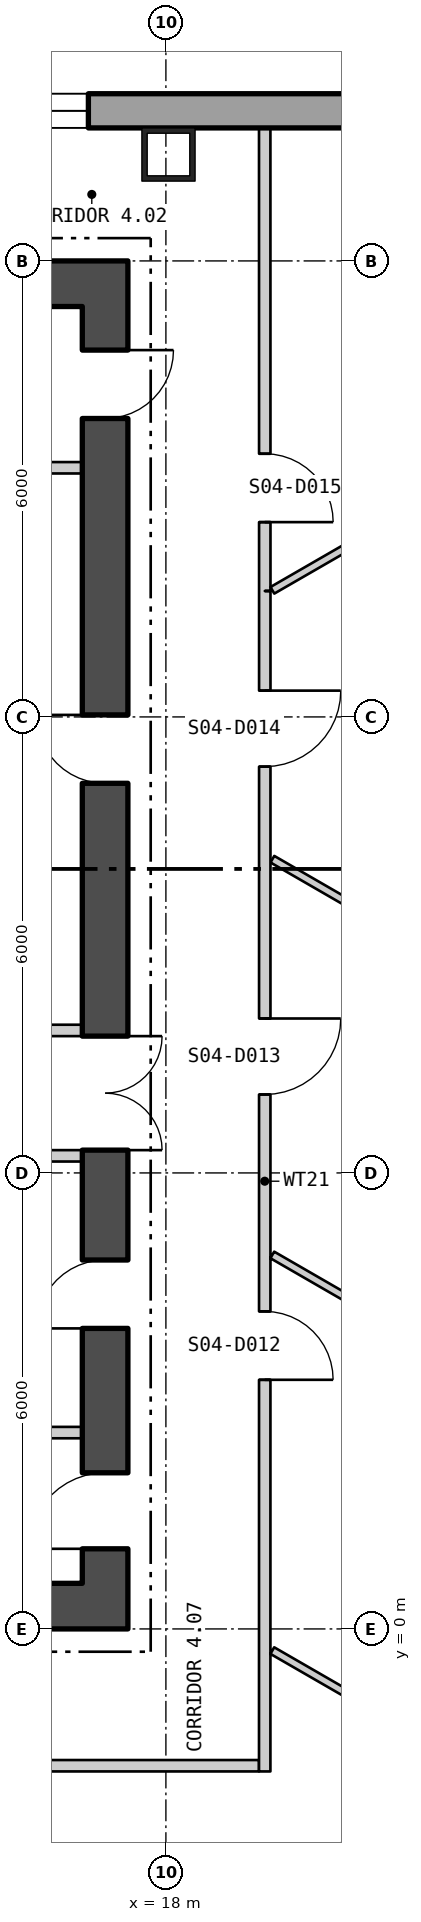
"""IFC4 building model, lengths in metres.
Left out: names, types, materials, properties, quantities, classifications, styles, units other than length and angle.
Written with IfcOpenShell. Run it as: python <this file> out.ifc"""

import sys

from ifc_helpers import new_model, si_unit, direction, frame, frame_2d, origin, origin_2d, place, context, subcontext, project, spatial, polyline, rectangle, hollow_rectangle, outline, extrude, element, fill, save


model = new_model("IFC4")
c1 = context("Model", 3, precision=1e-05, world=origin(), true_north=direction((0.0, 1.0)))
c2 = subcontext(c1, "Body", "Model", "MODEL_VIEW")
j1 = project(units=[si_unit("LENGTHUNIT", "METRE"), si_unit("PLANEANGLEUNIT", "RADIAN")], contexts=[c1])
p1 = place(None, origin())
s1 = spatial("IfcSite", under=j1, at=p1, CompositionType="ELEMENT")
p2 = place(p1, origin())
s2 = spatial("IfcBuilding", under=s1, at=p2, CompositionType="ELEMENT")
p3 = place(p2, frame((0.0, 0.0, 60.3)))
s3 = spatial("IfcBuildingStorey", under=s2, at=p3, CompositionType="ELEMENT", Elevation=60.3)
p4 = place(p3, frame((18.034, 19.4, 0.0), z_axis=(0.0, 0.0, 1.0), x_axis=(-1.0, 0.0, 0.0)))
e1 = element("IfcColumn", 1, at=p4, inside=s3, PredefinedType="COLUMN", context=c2, shape_type="SweptSolid", body=[
    extrude(hollow_rectangle(XDim=0.7, YDim=0.7, WallThickness=0.07, at=origin_2d()), origin(), (0.0, 0.0, 1.0), 4.5),
])
p5 = place(p3, frame((22.875, 19.975, -0.4), z_axis=(0.0, 0.0, 1.0), x_axis=(-1.0, 0.0, 0.0)))
e2 = element("IfcWall", 2, at=p5, inside=s3, PredefinedType="SOLIDWALL", context=c2, shape_type="SweptSolid", body=[
    extrude(outline(polyline([(-0.13, -0.225), (45.88, -0.225), (45.62, 0.225), (0.13, 0.225), (-0.13, -0.225)])), origin(), (0.0, 0.0, 1.0), 4.5),
])
p6 = place(p5, frame((5.895, 0.0, 1.3)))
e3 = element("IfcOpeningElement", 3, at=p6, cuts=e2, PredefinedType="OPENING", context=c2, shape_type="SweptSolid", body=[
    extrude(rectangle(XDim=2.4, YDim=2.6, at=frame_2d((1.2, 1.3))), frame((0.0, 0.235, 0.0), z_axis=(0.0, -1.0, 0.0), x_axis=(1.0, 0.0, 0.0)), (0.0, 0.0, 1.0), 0.47),
])
p7 = place(p5, frame((10.403, 0.0, 1.3)))
e4 = element("IfcOpeningElement", 4, at=p7, cuts=e2, PredefinedType="OPENING", context=c2, shape_type="SweptSolid", body=[
    extrude(rectangle(XDim=2.4, YDim=2.6, at=frame_2d((1.2, 1.3))), frame((0.0, 0.235, 0.0), z_axis=(0.0, -1.0, 0.0), x_axis=(1.0, 0.0, 0.0)), (0.0, 0.0, 1.0), 0.47),
])
p8 = place(p5, frame((14.912, 0.0, 1.3)))
e5 = element("IfcOpeningElement", 5, at=p8, cuts=e2, PredefinedType="OPENING", context=c2, shape_type="SweptSolid", body=[
    extrude(rectangle(XDim=2.4, YDim=2.6, at=frame_2d((1.2, 1.3))), frame((0.0, 0.235, 0.0), z_axis=(0.0, -1.0, 0.0), x_axis=(1.0, 0.0, 0.0)), (0.0, 0.0, 1.0), 0.47),
])
p9 = place(p5, frame((19.421, 0.0, 1.3)))
e6 = element("IfcOpeningElement", 6, at=p9, cuts=e2, PredefinedType="OPENING", context=c2, shape_type="SweptSolid", body=[
    extrude(rectangle(XDim=2.4, YDim=2.6, at=frame_2d((1.2, 1.3))), frame((0.0, 0.235, 0.0), z_axis=(0.0, -1.0, 0.0), x_axis=(1.0, 0.0, 0.0)), (0.0, 0.0, 1.0), 0.47),
])
p10 = place(p5, frame((23.929, 0.0, 1.3)))
e7 = element("IfcOpeningElement", 7, at=p10, cuts=e2, PredefinedType="OPENING", context=c2, shape_type="SweptSolid", body=[
    extrude(rectangle(XDim=2.4, YDim=2.6, at=frame_2d((1.2, 1.3))), frame((0.0, 0.235, 0.0), z_axis=(0.0, -1.0, 0.0), x_axis=(1.0, 0.0, 0.0)), (0.0, 0.0, 1.0), 0.47),
])
p11 = place(p5, frame((28.438, 0.0, 1.3)))
e8 = element("IfcOpeningElement", 8, at=p11, cuts=e2, PredefinedType="OPENING", context=c2, shape_type="SweptSolid", body=[
    extrude(rectangle(XDim=2.4, YDim=2.6, at=frame_2d((1.2, 1.3))), frame((0.0, 0.235, 0.0), z_axis=(0.0, -1.0, 0.0), x_axis=(1.0, 0.0, 0.0)), (0.0, 0.0, 1.0), 0.47),
])
p12 = place(p5, frame((32.947, 0.0, 1.3)))
e9 = element("IfcOpeningElement", 9, at=p12, cuts=e2, PredefinedType="OPENING", context=c2, shape_type="SweptSolid", body=[
    extrude(rectangle(XDim=2.4, YDim=2.6, at=frame_2d((1.2, 1.3))), frame((0.0, 0.235, 0.0), z_axis=(0.0, -1.0, 0.0), x_axis=(1.0, 0.0, 0.0)), (0.0, 0.0, 1.0), 0.47),
])
p13 = place(p5, frame((37.455, 0.0, 1.3)))
e10 = element("IfcOpeningElement", 10, at=p13, cuts=e2, PredefinedType="OPENING", context=c2, shape_type="SweptSolid", body=[
    extrude(rectangle(XDim=2.4, YDim=2.6, at=frame_2d((1.2, 1.3))), frame((0.0, 0.235, 0.0), z_axis=(0.0, -1.0, 0.0), x_axis=(1.0, 0.0, 0.0)), (0.0, 0.0, 1.0), 0.47),
])
p14 = place(p3, frame((5.425, -29.042, -0.18), z_axis=(0.0, 0.0, 1.0), x_axis=(0.499999388847, 0.866025756634, 0.0)))
e11 = element("IfcWall", 11, at=p14, inside=s3, PredefinedType="SOLIDWALL", context=c2, shape_type="SweptSolid", body=[
    extrude(outline(polyline([(-0.13, -0.225), (45.88, -0.225), (45.62, 0.225), (0.13, 0.225), (-0.13, -0.225)])), origin(), (0.0, 0.0, 1.0), 4.28),
])
p15 = place(p14, frame((1.425, 0.0, 1.08)))
e12 = element("IfcOpeningElement", 12, at=p15, cuts=e11, PredefinedType="OPENING", context=c2, shape_type="SweptSolid", body=[
    extrude(rectangle(XDim=2.4, YDim=2.6, at=frame_2d((1.2, 1.3))), frame((0.0, 0.235, 0.0), z_axis=(0.0, -1.0, 0.0), x_axis=(1.0, 0.0, 0.0)), (0.0, 0.0, 1.0), 0.47),
])
p16 = place(p14, frame((5.895, 0.0, 1.08)))
e13 = element("IfcOpeningElement", 13, at=p16, cuts=e11, PredefinedType="OPENING", context=c2, shape_type="SweptSolid", body=[
    extrude(rectangle(XDim=2.4, YDim=2.6, at=frame_2d((1.2, 1.3))), frame((0.0, 0.235, 0.0), z_axis=(0.0, -1.0, 0.0), x_axis=(1.0, 0.0, 0.0)), (0.0, 0.0, 1.0), 0.47),
])
p17 = place(p14, frame((10.403, 0.0, 1.08)))
e14 = element("IfcOpeningElement", 14, at=p17, cuts=e11, PredefinedType="OPENING", context=c2, shape_type="SweptSolid", body=[
    extrude(rectangle(XDim=2.4, YDim=2.6, at=frame_2d((1.2, 1.3))), frame((0.0, 0.235, 0.0), z_axis=(0.0, -1.0, 0.0), x_axis=(1.0, 0.0, 0.0)), (0.0, 0.0, 1.0), 0.47),
])
p18 = place(p14, frame((14.912, 0.0, 1.08)))
e15 = element("IfcOpeningElement", 15, at=p18, cuts=e11, PredefinedType="OPENING", context=c2, shape_type="SweptSolid", body=[
    extrude(rectangle(XDim=2.4, YDim=2.6, at=frame_2d((1.2, 1.3))), frame((0.0, 0.235, 0.0), z_axis=(0.0, -1.0, 0.0), x_axis=(1.0, 0.0, 0.0)), (0.0, 0.0, 1.0), 0.47),
])
p19 = place(p14, frame((19.421, 0.0, 1.08)))
e16 = element("IfcOpeningElement", 16, at=p19, cuts=e11, PredefinedType="OPENING", context=c2, shape_type="SweptSolid", body=[
    extrude(rectangle(XDim=2.4, YDim=2.6, at=frame_2d((1.2, 1.3))), frame((0.0, 0.235, 0.0), z_axis=(0.0, -1.0, 0.0), x_axis=(1.0, 0.0, 0.0)), (0.0, 0.0, 1.0), 0.47),
])
p20 = place(p14, frame((23.929, 0.0, 1.08)))
e17 = element("IfcOpeningElement", 17, at=p20, cuts=e11, PredefinedType="OPENING", context=c2, shape_type="SweptSolid", body=[
    extrude(rectangle(XDim=2.4, YDim=2.6, at=frame_2d((1.2, 1.3))), frame((0.0, 0.235, 0.0), z_axis=(0.0, -1.0, 0.0), x_axis=(1.0, 0.0, 0.0)), (0.0, 0.0, 1.0), 0.47),
])
p21 = place(p14, frame((28.438, 0.0, 1.08)))
e18 = element("IfcOpeningElement", 18, at=p21, cuts=e11, PredefinedType="OPENING", context=c2, shape_type="SweptSolid", body=[
    extrude(rectangle(XDim=2.4, YDim=2.6, at=frame_2d((1.2, 1.3))), frame((0.0, 0.235, 0.0), z_axis=(0.0, -1.0, 0.0), x_axis=(1.0, 0.0, 0.0)), (0.0, 0.0, 1.0), 0.47),
])
p22 = place(p14, frame((32.947, 0.0, 1.08)))
e19 = element("IfcOpeningElement", 19, at=p22, cuts=e11, PredefinedType="OPENING", context=c2, shape_type="SweptSolid", body=[
    extrude(rectangle(XDim=2.4, YDim=2.6, at=frame_2d((1.2, 1.3))), frame((0.0, 0.235, 0.0), z_axis=(0.0, -1.0, 0.0), x_axis=(1.0, 0.0, 0.0)), (0.0, 0.0, 1.0), 0.47),
])
p23 = place(p14, frame((37.455, 0.0, 1.08)))
e20 = element("IfcOpeningElement", 20, at=p23, cuts=e11, PredefinedType="OPENING", context=c2, shape_type="SweptSolid", body=[
    extrude(rectangle(XDim=2.4, YDim=2.6, at=frame_2d((1.2, 1.3))), frame((0.0, 0.235, 0.0), z_axis=(0.0, -1.0, 0.0), x_axis=(1.0, 0.0, 0.0)), (0.0, 0.0, 1.0), 0.47),
])
p24 = place(p14, frame((41.925, 0.0, 1.08)))
e21 = element("IfcOpeningElement", 21, at=p24, cuts=e11, PredefinedType="OPENING", context=c2, shape_type="SweptSolid", body=[
    extrude(rectangle(XDim=2.4, YDim=2.6, at=frame_2d((1.2, 1.3))), frame((0.0, 0.235, 0.0), z_axis=(0.0, -1.0, 0.0), x_axis=(1.0, 0.0, 0.0)), (0.0, 0.0, 1.0), 0.47),
])
p25 = place(p3, frame((-17.5, 0.3, 0.0), z_axis=(0.0, 0.0, 1.0), x_axis=(1.0, 0.0, 0.0)))
e22 = element("IfcWall", 22, at=p25, inside=s3, PredefinedType="SHEAR", context=c2, shape_type="SweptSolid", body=[
    extrude(rectangle(XDim=35.0, YDim=0.6, at=frame_2d((17.5, 0.0))), origin(), (0.0, 0.0, 1.0), 4.3),
])
p26 = place(p25, frame((12.0, 0.0, 0.0)))
e23 = element("IfcOpeningElement", 23, at=p26, cuts=e22, PredefinedType="OPENING", context=c2, shape_type="SweptSolid", body=[
    extrude(rectangle(XDim=1.8, YDim=2.4, at=frame_2d((0.9, 1.2))), frame((0.0, 0.31, 0.0), z_axis=(0.0, -1.0, 0.0), x_axis=(1.0, 0.0, 0.0)), (0.0, 0.0, 1.0), 0.62),
])
p27 = place(p25, frame((22.0, 0.0, 0.0)))
e24 = element("IfcOpeningElement", 24, at=p27, cuts=e22, PredefinedType="OPENING", context=c2, shape_type="SweptSolid", body=[
    extrude(rectangle(XDim=1.8, YDim=2.4, at=frame_2d((0.9, 1.2))), frame((0.0, 0.31, 0.0), z_axis=(0.0, -1.0, 0.0), x_axis=(1.0, 0.0, 0.0)), (0.0, 0.0, 1.0), 0.62),
])
p28 = place(p3, frame((-17.5, 17.7, 0.0), z_axis=(0.0, 0.0, 1.0), x_axis=(1.0, 0.0, 0.0)))
e25 = element("IfcWall", 25, at=p28, inside=s3, PredefinedType="SHEAR", context=c2, shape_type="SweptSolid", body=[
    extrude(rectangle(XDim=35.0, YDim=0.6, at=frame_2d((17.5, 0.0))), origin(), (0.0, 0.0, 1.0), 4.3),
])
p29 = place(p3, frame((17.2, 0.6, 0.0), z_axis=(0.0, 0.0, 1.0), x_axis=(0.0, 1.0, 0.0)))
e26 = element("IfcWall", 26, at=p29, inside=s3, PredefinedType="SHEAR", context=c2, shape_type="SweptSolid", body=[
    extrude(rectangle(XDim=16.8, YDim=0.6, at=frame_2d((8.4, 0.0))), origin(), (0.0, 0.0, 1.0), 4.3),
])
p30 = place(p29, frame((5.7, 0.0, 0.0)))
e27 = element("IfcOpeningElement", 27, at=p30, cuts=e26, PredefinedType="OPENING", context=c2, shape_type="SweptSolid", body=[
    extrude(rectangle(XDim=1.5, YDim=2.1, at=frame_2d((0.75, 1.05))), frame((0.0, 0.31, 0.0), z_axis=(0.0, -1.0, 0.0), x_axis=(1.0, 0.0, 0.0)), (0.0, 0.0, 1.0), 0.62),
])
p31 = place(p29, frame((0.454, 0.0, 0.0)))
e28 = element("IfcOpeningElement", 28, at=p31, cuts=e26, PredefinedType="OPENING", context=c2, shape_type="SweptSolid", body=[
    extrude(rectangle(XDim=1.0, YDim=2.1, at=frame_2d((0.5, 1.05))), frame((0.0, 0.31, 0.0), z_axis=(0.0, -1.0, 0.0), x_axis=(1.0, 0.0, 0.0)), (0.0, 0.0, 1.0), 0.62),
])
p32 = place(p29, frame((3.354, 0.0, 0.0)))
e29 = element("IfcOpeningElement", 29, at=p32, cuts=e26, PredefinedType="OPENING", context=c2, shape_type="SweptSolid", body=[
    extrude(rectangle(XDim=0.9, YDim=2.1, at=frame_2d((0.45, 1.05))), frame((0.0, 0.31, 0.0), z_axis=(0.0, -1.0, 0.0), x_axis=(1.0, 0.0, 0.0)), (0.0, 0.0, 1.0), 0.62),
])
p33 = place(p29, frame((10.527, 0.0, 0.0)))
e30 = element("IfcOpeningElement", 30, at=p33, cuts=e26, PredefinedType="OPENING", context=c2, shape_type="SweptSolid", body=[
    extrude(rectangle(XDim=0.9, YDim=2.1, at=frame_2d((0.45, 1.05))), frame((0.0, 0.31, 0.0), z_axis=(0.0, -1.0, 0.0), x_axis=(1.0, 0.0, 0.0)), (0.0, 0.0, 1.0), 0.62),
])
p34 = place(p29, frame((15.327, 0.0, 0.0)))
e31 = element("IfcOpeningElement", 31, at=p34, cuts=e26, PredefinedType="OPENING", context=c2, shape_type="SweptSolid", body=[
    extrude(rectangle(XDim=0.9, YDim=2.1, at=frame_2d((0.45, 1.05))), frame((0.0, 0.31, 0.0), z_axis=(0.0, -1.0, 0.0), x_axis=(1.0, 0.0, 0.0)), (0.0, 0.0, 1.0), 0.62),
])
for number, where, z_axis, x_axis in (
    (32, (14.5, 6.225, 0.0), (0.0, 0.0, 1.0), (1.0, 0.0, 0.0)),
    (33, (14.5, 7.875, 0.0), (0.0, 0.0, 1.0), (1.0, 0.0, 0.0)),
    (34, (14.5, 2.583, 0.0), (0.0, 0.0, 1.0), (1.0, 0.0, 0.0)),
    (35, (14.5, 15.278, 0.0), (0.0, 0.0, 1.0), (1.0, 0.0, 0.0)),
):
    element("IfcWall", number, at=place(p3, frame(where, z_axis=z_axis, x_axis=x_axis)), inside=s3, PredefinedType="PARTITIONING", context=c2, shape_type="SweptSolid", body=[
        extrude(rectangle(XDim=2.4, YDim=0.15, at=frame_2d((1.2, 0.0))), origin(), (0.0, 0.0, 1.0), 4.3),
    ])
p35 = place(p3, frame((7.855, -1.8, 0.0), z_axis=(0.0, 0.0, 1.0), x_axis=(1.0, 0.0, 0.0)))
e36 = element("IfcWall", 36, at=p35, inside=s3, PredefinedType="PARTITIONING", context=c2, shape_type="SweptSolid", body=[
    extrude(rectangle(XDim=11.37, YDim=0.15, at=frame_2d((5.685, 0.0))), origin(), (0.0, 0.0, 1.0), 4.3),
])
p36 = place(p35, frame((2.001, 0.0, 0.0)))
e37 = element("IfcOpeningElement", 37, at=p36, cuts=e36, PredefinedType="OPENING", context=c2, shape_type="SweptSolid", body=[
    extrude(rectangle(XDim=1.0, YDim=2.1, at=frame_2d((0.5, 1.05))), frame((0.0, 0.085, 0.0), z_axis=(0.0, -1.0, 0.0), x_axis=(1.0, 0.0, 0.0)), (0.0, 0.0, 1.0), 0.17),
])
p37 = place(p35, frame((7.455, 0.0, 0.0)))
e38 = element("IfcOpeningElement", 38, at=p37, cuts=e36, PredefinedType="OPENING", context=c2, shape_type="SweptSolid", body=[
    extrude(rectangle(XDim=0.9, YDim=2.1, at=frame_2d((0.45, 1.05))), frame((0.0, 0.085, 0.0), z_axis=(0.0, -1.0, 0.0), x_axis=(1.0, 0.0, 0.0)), (0.0, 0.0, 1.0), 0.17),
])
p38 = place(p3, frame((13.249, -1.94, 0.0), z_axis=(0.0, 0.0, 1.0), x_axis=(0.866035445757, -0.49998260639, 0.0)))
e39 = element("IfcWall", 39, at=p38, inside=s3, PredefinedType="PARTITIONING", context=c2, shape_type="SweptSolid", body=[
    extrude(rectangle(XDim=6.1, YDim=0.15, at=frame_2d((3.05, 0.0))), origin(), (0.0, 0.0, 1.0), 4.3),
])
p39 = place(p3, frame((19.3, -1.875, 0.0), z_axis=(0.0, 0.0, 1.0), x_axis=(6.4383209e-05, 0.999999997927, 0.0)))
e40 = element("IfcWall", 40, at=p39, inside=s3, PredefinedType="PARTITIONING", context=c2, shape_type="SweptSolid", body=[
    extrude(rectangle(XDim=15.532, YDim=0.15, at=frame_2d((7.766, 0.0))), origin(), (0.0, 0.0, 1.0), 4.3),
])
p40 = place(p39, frame((5.153, 0.0, 0.0)))
e41 = element("IfcOpeningElement", 41, at=p40, cuts=e40, PredefinedType="OPENING", context=c2, shape_type="SweptSolid", body=[
    extrude(rectangle(XDim=0.9, YDim=2.1, at=frame_2d((0.45, 1.05))), frame((0.0, 0.085, 0.0), z_axis=(0.0, -1.0, 0.0), x_axis=(1.0, 0.0, 0.0)), (0.0, 0.0, 1.0), 0.17),
])
p41 = place(p39, frame((8.907, 0.0, 0.0)))
e42 = element("IfcOpeningElement", 42, at=p41, cuts=e40, PredefinedType="OPENING", context=c2, shape_type="SweptSolid", body=[
    extrude(rectangle(XDim=1.0, YDim=2.1, at=frame_2d((0.5, 1.05))), frame((0.0, 0.085, 0.0), z_axis=(0.0, -1.0, 0.0), x_axis=(1.0, 0.0, 0.0)), (0.0, 0.0, 1.0), 0.17),
])
p42 = place(p39, frame((13.221, 0.0, 0.0)))
e43 = element("IfcOpeningElement", 43, at=p42, cuts=e40, PredefinedType="OPENING", context=c2, shape_type="SweptSolid", body=[
    extrude(rectangle(XDim=1.0, YDim=2.1, at=frame_2d((0.5, 1.05))), frame((0.0, 0.085, 0.0), z_axis=(0.0, -1.0, 0.0), x_axis=(1.0, 0.0, 0.0)), (0.0, 0.0, 1.0), 0.17),
])
p43 = place(p3, frame((19.3, 19.749, 0.0), z_axis=(0.0, 0.0, 1.0), x_axis=(0.000164149702, -0.999999986527, 0.0)))
e44 = element("IfcWall", 44, at=p43, inside=s3, PredefinedType="PARTITIONING", context=c2, shape_type="SweptSolid", body=[
    extrude(rectangle(XDim=6.092, YDim=0.15, at=frame_2d((3.046, 0.0))), origin(), (0.0, 0.0, 1.0), 4.3),
])
p44 = place(p43, frame((4.286, 0.0, 0.0)))
e45 = element("IfcOpeningElement", 45, at=p44, cuts=e44, PredefinedType="OPENING", context=c2, shape_type="SweptSolid", body=[
    extrude(rectangle(XDim=0.9, YDim=2.1, at=frame_2d((0.45, 1.05))), frame((0.0, 0.085, 0.0), z_axis=(0.0, -1.0, 0.0), x_axis=(1.0, 0.0, 0.0)), (0.0, 0.0, 1.0), 0.17),
])
p45 = place(p3, frame((19.4, -0.285, 0.0), z_axis=(0.0, 0.0, 1.0), x_axis=(0.866237568633, -0.499632339514, 0.0)))
e46 = element("IfcWall", 46, at=p45, inside=s3, PredefinedType="PARTITIONING", context=c2, shape_type="SweptSolid", body=[
    extrude(rectangle(XDim=1.601, YDim=0.1, at=frame_2d((0.801, 0.0))), origin(), (0.0, 0.0, 1.0), 4.3),
])
p46 = place(p3, frame((19.4, 4.921, 0.0), z_axis=(0.0, 0.0, 1.0), x_axis=(0.866039032844, -0.499976393034, 0.0)))
e47 = element("IfcWall", 47, at=p46, inside=s3, PredefinedType="PARTITIONING", context=c2, shape_type="SweptSolid", body=[
    extrude(rectangle(XDim=4.204, YDim=0.1, at=frame_2d((2.102, 0.0))), origin(), (0.0, 0.0, 1.0), 4.3),
])
p47 = place(p3, frame((19.401, 10.128, 0.0), z_axis=(0.0, 0.0, 1.0), x_axis=(0.865992313895, -0.50005730899, 0.0)))
e48 = element("IfcWall", 48, at=p47, inside=s3, PredefinedType="PARTITIONING", context=c2, shape_type="SweptSolid", body=[
    extrude(rectangle(XDim=6.807, YDim=0.1, at=frame_2d((3.404, 0.0))), origin(), (0.0, 0.0, 1.0), 4.3),
])
p48 = place(p3, frame((19.401, 13.666, 0.0), z_axis=(0.0, 0.0, 1.0), x_axis=(0.866161319146, 0.499764513761, 0.0)))
e49 = element("IfcWall", 49, at=p48, inside=s3, PredefinedType="PARTITIONING", context=c2, shape_type="SweptSolid", body=[
    extrude(rectangle(XDim=5.489, YDim=0.1, at=frame_2d((2.744, 0.0))), origin(), (0.0, 0.0, 1.0), 4.3),
])
p49 = place(p6, origin())
e50 = element("IfcWindow", 50, at=p49, inside=s3, PartitioningType="SINGLE_PANEL", PredefinedType="WINDOW", context=c2, shape_type="SweptSolid", body=[
    extrude(rectangle(XDim=2.4, YDim=2.6, at=frame_2d((1.2, 1.3))), frame((0.0, 0.105, 0.0), z_axis=(0.0, -1.0, 0.0), x_axis=(1.0, 0.0, 0.0)), (0.0, 0.0, 1.0), 0.06),
])
fill(e3, e50)
p50 = place(p21, origin())
e51 = element("IfcWindow", 51, at=p50, inside=s3, PartitioningType="SINGLE_PANEL", PredefinedType="WINDOW", context=c2, shape_type="SweptSolid", body=[
    extrude(rectangle(XDim=2.4, YDim=2.6, at=frame_2d((1.2, 1.3))), frame((0.0, 0.105, 0.0), z_axis=(0.0, -1.0, 0.0), x_axis=(1.0, 0.0, 0.0)), (0.0, 0.0, 1.0), 0.06),
])
fill(e18, e51)
p51 = place(p30, origin())
e52 = element("IfcDoor", 52, at=p51, inside=s3, OperationType="DOUBLE_DOOR_SINGLE_SWING", PredefinedType="DOOR", context=c2, shape_type="SweptSolid", body=[
    extrude(rectangle(XDim=1.5, YDim=2.1, at=frame_2d((0.75, 1.05))), frame((0.0, 0.025, 0.0), z_axis=(0.0, -1.0, 0.0), x_axis=(1.0, 0.0, 0.0)), (0.0, 0.0, 1.0), 0.05),
])
fill(e27, e52)
p52 = place(p31, origin())
e53 = element("IfcDoor", 53, at=p52, inside=s3, OperationType="SINGLE_SWING_RIGHT", PredefinedType="DOOR", context=c2, shape_type="SweptSolid", body=[
    extrude(rectangle(XDim=1.0, YDim=2.1, at=frame_2d((0.5, 1.05))), frame((0.0, 0.025, 0.0), z_axis=(0.0, -1.0, 0.0), x_axis=(1.0, 0.0, 0.0)), (0.0, 0.0, 1.0), 0.05),
])
fill(e28, e53)
p53 = place(p32, origin())
e54 = element("IfcDoor", 54, at=p53, inside=s3, OperationType="SINGLE_SWING_RIGHT", PredefinedType="DOOR", context=c2, shape_type="SweptSolid", body=[
    extrude(rectangle(XDim=0.9, YDim=2.1, at=frame_2d((0.45, 1.05))), frame((0.0, 0.025, 0.0), z_axis=(0.0, -1.0, 0.0), x_axis=(1.0, 0.0, 0.0)), (0.0, 0.0, 1.0), 0.05),
])
fill(e29, e54)
p54 = place(p33, origin())
e55 = element("IfcDoor", 55, at=p54, inside=s3, OperationType="SINGLE_SWING_LEFT", PredefinedType="DOOR", context=c2, shape_type="SweptSolid", body=[
    extrude(rectangle(XDim=0.9, YDim=2.1, at=frame_2d((0.45, 1.05))), frame((0.0, 0.025, 0.0), z_axis=(0.0, -1.0, 0.0), x_axis=(1.0, 0.0, 0.0)), (0.0, 0.0, 1.0), 0.05),
])
fill(e30, e55)
p55 = place(p34, origin())
e56 = element("IfcDoor", 56, at=p55, inside=s3, OperationType="SINGLE_SWING_RIGHT", PredefinedType="DOOR", context=c2, shape_type="SweptSolid", body=[
    extrude(rectangle(XDim=0.9, YDim=2.1, at=frame_2d((0.45, 1.05))), frame((0.0, 0.025, 0.0), z_axis=(0.0, -1.0, 0.0), x_axis=(1.0, 0.0, 0.0)), (0.0, 0.0, 1.0), 0.05),
])
fill(e31, e56)
p56 = place(p40, origin())
e57 = element("IfcDoor", 57, at=p56, inside=s3, OperationType="SINGLE_SWING_LEFT", PredefinedType="DOOR", context=c2, shape_type="SweptSolid", body=[
    extrude(rectangle(XDim=0.9, YDim=2.1, at=frame_2d((0.45, 1.05))), frame((0.0, 0.025, 0.0), z_axis=(0.0, -1.0, 0.0), x_axis=(1.0, 0.0, 0.0)), (0.0, 0.0, 1.0), 0.05),
])
fill(e41, e57)
p57 = place(p41, origin())
e58 = element("IfcDoor", 58, at=p57, inside=s3, OperationType="SINGLE_SWING_RIGHT", PredefinedType="DOOR", context=c2, shape_type="SweptSolid", body=[
    extrude(rectangle(XDim=1.0, YDim=2.1, at=frame_2d((0.5, 1.05))), frame((0.0, 0.025, 0.0), z_axis=(0.0, -1.0, 0.0), x_axis=(1.0, 0.0, 0.0)), (0.0, 0.0, 1.0), 0.05),
])
fill(e42, e58)
p58 = place(p42, origin())
e59 = element("IfcDoor", 59, at=p58, inside=s3, OperationType="SINGLE_SWING_RIGHT", PredefinedType="DOOR", context=c2, shape_type="SweptSolid", body=[
    extrude(rectangle(XDim=1.0, YDim=2.1, at=frame_2d((0.5, 1.05))), frame((0.0, 0.025, 0.0), z_axis=(0.0, -1.0, 0.0), x_axis=(1.0, 0.0, 0.0)), (0.0, 0.0, 1.0), 0.05),
])
fill(e43, e59)
p59 = place(p44, origin())
e60 = element("IfcDoor", 60, at=p59, inside=s3, OperationType="SINGLE_SWING_LEFT", PredefinedType="DOOR", context=c2, shape_type="SweptSolid", body=[
    extrude(rectangle(XDim=0.9, YDim=2.1, at=frame_2d((0.45, 1.05))), frame((0.0, 0.025, 0.0), z_axis=(0.0, -1.0, 0.0), x_axis=(1.0, 0.0, 0.0)), (0.0, 0.0, 1.0), 0.05),
])
fill(e45, e60)
save(model, sys.argv[1])
